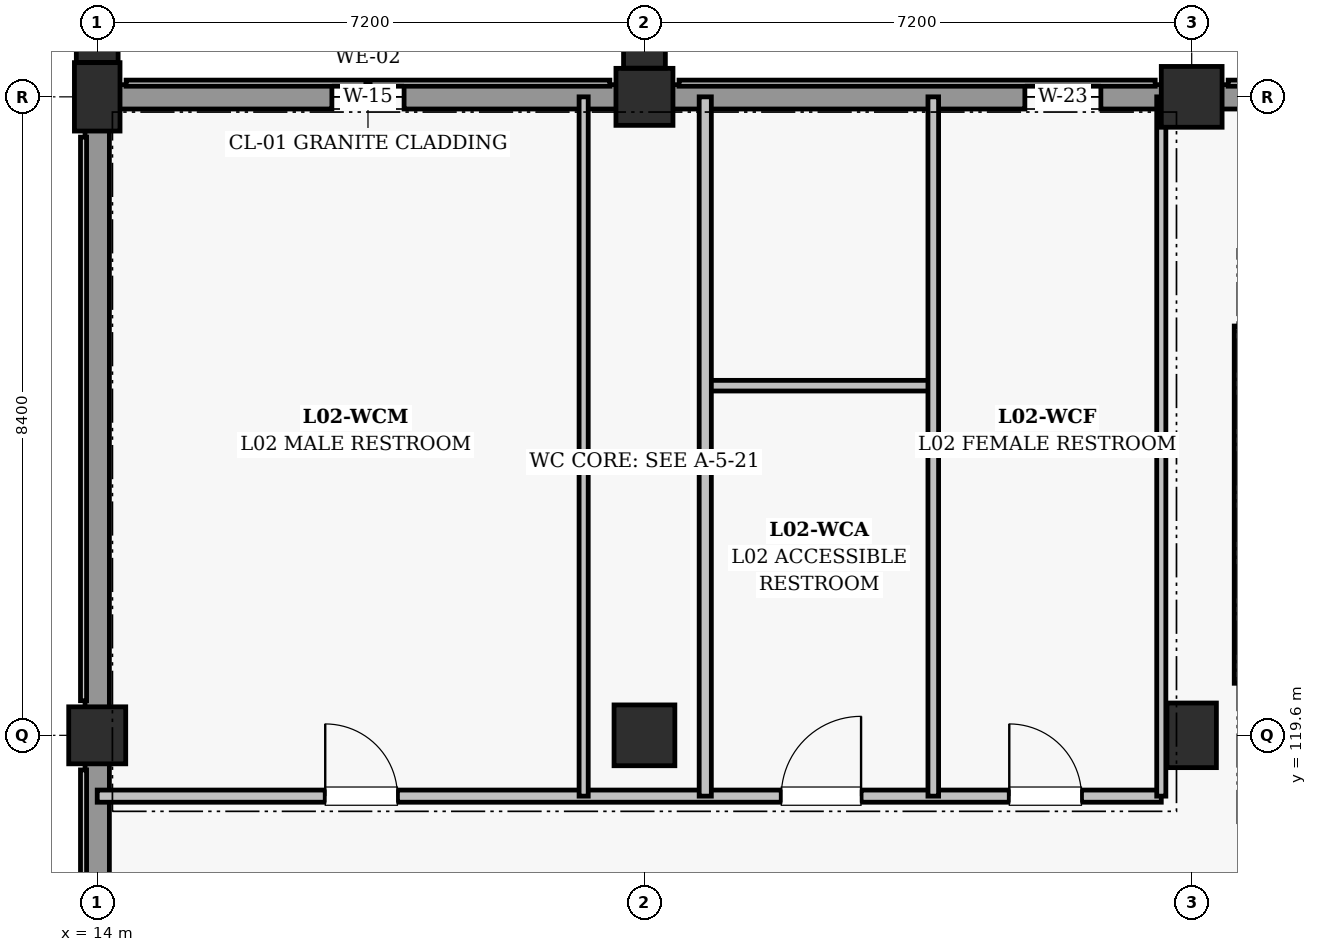
"""IFC4 building model, lengths in metres.
Left out: names, types, materials, properties, quantities, classifications, styles, units other than length and angle.
Written with IfcOpenShell. Run it as: python <this file> out.ifc"""

import sys

from ifc_helpers import new_model, si_unit, direction, frame, frame_2d, origin, origin_2d, place, context, subcontext, project, spatial, rectangle, extrude, element, fill, save


model = new_model("IFC4")
c1 = context("Model", 3, precision=1e-05, world=origin(), true_north=direction((0.0, 1.0)))
c2 = subcontext(c1, "Body", "Model", "MODEL_VIEW")
j1 = project(units=[si_unit("LENGTHUNIT", "METRE"), si_unit("PLANEANGLEUNIT", "RADIAN")], contexts=[c1])
p1 = place(None, origin())
s1 = spatial("IfcSite", under=j1, at=p1, CompositionType="ELEMENT")
p2 = place(p1, origin())
s2 = spatial("IfcBuilding", under=s1, at=p2, CompositionType="ELEMENT")
p3 = place(p2, frame((0.0, 0.0, 9.9)))
s3 = spatial("IfcBuildingStorey", under=s2, at=p3, CompositionType="ELEMENT", Elevation=9.9)
p4 = place(p3, frame((14.0, 119.6, 0.0), z_axis=(0.0, 0.0, 1.0), x_axis=(1.0, 0.0, 0.0)))
e1 = element("IfcColumn", 1, at=p4, inside=s3, PredefinedType="COLUMN", context=c2, shape_type="SweptSolid", body=[
    extrude(rectangle(XDim=0.75, YDim=0.75, at=origin_2d()), origin(), (0.0, 0.0, 1.0), 4.5),
])
p5 = place(p3, frame((14.0, 128.0, 0.0), z_axis=(0.0, 0.0, 1.0), x_axis=(1.0, 0.0, 0.0)))
e2 = element("IfcColumn", 2, at=p5, inside=s3, PredefinedType="COLUMN", context=c2, shape_type="SweptSolid", body=[
    extrude(rectangle(XDim=0.6, YDim=0.9, at=origin_2d()), origin(), (0.0, 0.0, 1.0), 4.5),
])
p6 = place(p3, frame((21.2, 119.6, 0.0), z_axis=(0.0, 0.0, 1.0), x_axis=(1.0, 0.0, 0.0)))
e3 = element("IfcColumn", 3, at=p6, inside=s3, PredefinedType="COLUMN", context=c2, shape_type="SweptSolid", body=[
    extrude(rectangle(XDim=0.8, YDim=0.8, at=origin_2d()), origin(), (0.0, 0.0, 1.0), 4.5),
])
p7 = place(p3, frame((21.2, 128.0, 0.0), z_axis=(0.0, 0.0, 1.0), x_axis=(1.0, 0.0, 0.0)))
e4 = element("IfcColumn", 4, at=p7, inside=s3, PredefinedType="COLUMN", context=c2, shape_type="SweptSolid", body=[
    extrude(rectangle(XDim=0.75, YDim=0.75, at=origin_2d()), origin(), (0.0, 0.0, 1.0), 4.5),
])
p8 = place(p3, frame((28.4, 119.6, 0.0), z_axis=(0.0, 0.0, 1.0), x_axis=(1.0, 0.0, 0.0)))
e5 = element("IfcColumn", 5, at=p8, inside=s3, PredefinedType="COLUMN", context=c2, shape_type="SweptSolid", body=[
    extrude(rectangle(XDim=0.65, YDim=0.85, at=origin_2d()), origin(), (0.0, 0.0, 1.0), 4.5),
])
p9 = place(p3, frame((28.4, 128.0, 0.0), z_axis=(0.0, 0.0, 1.0), x_axis=(1.0, 0.0, 0.0)))
e6 = element("IfcColumn", 6, at=p9, inside=s3, PredefinedType="COLUMN", context=c2, shape_type="SweptSolid", body=[
    extrude(rectangle(XDim=0.8, YDim=0.8, at=origin_2d()), origin(), (0.0, 0.0, 1.0), 4.5),
])
for number, where, z_axis, x_axis in (
    (7, (14.0, 128.853, 0.0), (0.0, 0.0, 1.0), (1.0, 0.0, 0.0)),
    (8, (21.2, 128.778, 0.0), (0.0, 0.0, 1.0), (1.0, 0.0, 0.0)),
):
    element("IfcColumn", number, at=place(p3, frame(where, z_axis=z_axis, x_axis=x_axis)), inside=s3, PredefinedType="PILASTER", context=c2, shape_type="SweptSolid", body=[
        extrude(rectangle(XDim=0.55, YDim=0.8, at=origin_2d()), origin(), (0.0, 0.0, 1.0), 4.5),
    ])
p10 = place(p3, frame((14.28, 128.0, 0.0), z_axis=(0.0, 0.0, 1.0), x_axis=(1.0, 0.0, 0.0)))
e9 = element("IfcWall", 9, at=p10, inside=s3, PredefinedType="SOLIDWALL", context=c2, shape_type="SweptSolid", body=[
    extrude(rectangle(XDim=6.565, YDim=0.32, at=frame_2d((3.282, 0.0))), origin(), (0.0, 0.0, 1.0), 3.305),
])
p11 = place(p10, frame((2.808, 0.0, 0.95)))
e10 = element("IfcOpeningElement", 10, at=p11, cuts=e9, PredefinedType="OPENING", context=c2, shape_type="SweptSolid", body=[
    extrude(rectangle(XDim=0.95, YDim=2.1, at=frame_2d((0.475, 1.05))), frame((0.0, 0.17, 0.0), z_axis=(0.0, -1.0, 0.0), x_axis=(1.0, 0.0, 0.0)), (0.0, 0.0, 1.0), 0.34),
])
p12 = place(p3, frame((21.555, 128.0, 0.0), z_axis=(0.0, 0.0, 1.0), x_axis=(1.0, 0.0, 0.0)))
e11 = element("IfcWall", 11, at=p12, inside=s3, PredefinedType="SOLIDWALL", context=c2, shape_type="SweptSolid", body=[
    extrude(rectangle(XDim=6.465, YDim=0.32, at=frame_2d((3.232, 0.0))), origin(), (0.0, 0.0, 1.0), 3.305),
])
p13 = place(p12, frame((4.65, 0.0, 1.85)))
e12 = element("IfcOpeningElement", 12, at=p13, cuts=e11, PredefinedType="OPENING", context=c2, shape_type="SweptSolid", body=[
    extrude(rectangle(XDim=1.0, YDim=0.95, at=frame_2d((0.5, 0.475))), frame((0.0, 0.17, 0.0), z_axis=(0.0, -1.0, 0.0), x_axis=(1.0, 0.0, 0.0)), (0.0, 0.0, 1.0), 0.34),
])
p14 = place(p3, frame((28.78, 128.0, 0.0), z_axis=(0.0, 0.0, 1.0), x_axis=(1.0, 0.0, 0.0)))
e13 = element("IfcWall", 13, at=p14, inside=s3, PredefinedType="SOLIDWALL", context=c2, shape_type="SweptSolid", body=[
    extrude(rectangle(XDim=6.515, YDim=0.32, at=frame_2d((3.257, 0.0))), origin(), (0.0, 0.0, 1.0), 3.355),
])
p15 = place(p3, frame((14.0, 111.555, 0.0), z_axis=(0.0, 0.0, 1.0), x_axis=(0.0, 1.0, 0.0)))
e14 = element("IfcWall", 14, at=p15, inside=s3, PredefinedType="SOLIDWALL", context=c2, shape_type="SweptSolid", body=[
    extrude(rectangle(XDim=7.69, YDim=0.32, at=frame_2d((3.845, 0.0))), origin(), (0.0, 0.0, 1.0), 3.405),
])
p16 = place(p3, frame((14.0, 119.955, 0.0), z_axis=(0.0, 0.0, 1.0), x_axis=(0.0, 1.0, 0.0)))
e15 = element("IfcWall", 15, at=p16, inside=s3, PredefinedType="SOLIDWALL", context=c2, shape_type="SweptSolid", body=[
    extrude(rectangle(XDim=7.615, YDim=0.32, at=frame_2d((3.808, 0.0))), origin(), (0.0, 0.0, 1.0), 3.405),
])
p17 = place(p3, frame((29.085, 124.985, 0.0), z_axis=(0.0, 0.0, 1.0), x_axis=(0.0, -1.0, 0.0)))
e16 = element("IfcWall", 16, at=p17, inside=s3, PredefinedType="SHEAR", context=c2, shape_type="SweptSolid", body=[
    extrude(rectangle(XDim=4.7, YDim=0.25, at=frame_2d((2.35, 0.0))), origin(), (0.0, 0.0, 1.0), 4.175),
])
p18 = place(p3, frame((14.0, 118.8, 0.0), z_axis=(0.0, 0.0, 1.0), x_axis=(1.0, 0.0, 0.0)))
e17 = element("IfcWall", 17, at=p18, inside=s3, PredefinedType="PARTITIONING", context=c2, shape_type="SweptSolid", body=[
    extrude(rectangle(XDim=14.0, YDim=0.16, at=frame_2d((7.0, 0.0))), origin(), (0.0, 0.0, 1.0), 3.36),
])
p19 = place(p18, frame((3.0, 0.0, 0.0)))
e18 = element("IfcOpeningElement", 18, at=p19, cuts=e17, PredefinedType="OPENING", context=c2, shape_type="SweptSolid", body=[
    extrude(rectangle(XDim=0.95, YDim=2.15, at=frame_2d((0.475, 1.075))), frame((0.0, 0.09, 0.0), z_axis=(0.0, -1.0, 0.0), x_axis=(1.0, 0.0, 0.0)), (0.0, 0.0, 1.0), 0.18),
])
p20 = place(p18, frame((9.0, 0.0, 0.0)))
e19 = element("IfcOpeningElement", 19, at=p20, cuts=e17, PredefinedType="OPENING", context=c2, shape_type="SweptSolid", body=[
    extrude(rectangle(XDim=1.05, YDim=2.15, at=frame_2d((0.525, 1.075))), frame((0.0, 0.09, 0.0), z_axis=(0.0, -1.0, 0.0), x_axis=(1.0, 0.0, 0.0)), (0.0, 0.0, 1.0), 0.18),
])
p21 = place(p18, frame((12.0, 0.0, 0.0)))
e20 = element("IfcOpeningElement", 20, at=p21, cuts=e17, PredefinedType="OPENING", context=c2, shape_type="SweptSolid", body=[
    extrude(rectangle(XDim=0.95, YDim=2.15, at=frame_2d((0.475, 1.075))), frame((0.0, 0.09, 0.0), z_axis=(0.0, -1.0, 0.0), x_axis=(1.0, 0.0, 0.0)), (0.0, 0.0, 1.0), 0.18),
])
p22 = place(p3, frame((22.0, 124.2, 0.0), z_axis=(0.0, 0.0, 1.0), x_axis=(1.0, 0.0, 0.0)))
e21 = element("IfcWall", 21, at=p22, inside=s3, PredefinedType="PARTITIONING", context=c2, shape_type="SweptSolid", body=[
    extrude(rectangle(XDim=3.0, YDim=0.14, at=frame_2d((1.5, 0.0))), origin(), (0.0, 0.0, 1.0), 3.56),
])
p23 = place(p3, frame((20.4, 118.8, 0.0), z_axis=(0.0, 0.0, 1.0), x_axis=(0.0, 1.0, 0.0)))
e22 = element("IfcWall", 22, at=p23, inside=s3, PredefinedType="PARTITIONING", context=c2, shape_type="SweptSolid", body=[
    extrude(rectangle(XDim=9.2, YDim=0.12, at=frame_2d((4.6, 0.0))), origin(), (0.0, 0.0, 1.0), 3.41),
])
p24 = place(p3, frame((22.0, 118.8, 0.0), z_axis=(0.0, 0.0, 1.0), x_axis=(0.0, 1.0, 0.0)))
e23 = element("IfcWall", 23, at=p24, inside=s3, PredefinedType="PARTITIONING", context=c2, shape_type="SweptSolid", body=[
    extrude(rectangle(XDim=9.2, YDim=0.16, at=frame_2d((4.6, 0.0))), origin(), (0.0, 0.0, 1.0), 3.36),
])
p25 = place(p3, frame((25.0, 118.8, 0.0), z_axis=(0.0, 0.0, 1.0), x_axis=(0.0, 1.0, 0.0)))
e24 = element("IfcWall", 24, at=p25, inside=s3, PredefinedType="PARTITIONING", context=c2, shape_type="SweptSolid", body=[
    extrude(rectangle(XDim=9.2, YDim=0.14, at=frame_2d((4.6, 0.0))), origin(), (0.0, 0.0, 1.0), 3.36),
])
p26 = place(p3, frame((28.0, 118.8, 0.0), z_axis=(0.0, 0.0, 1.0), x_axis=(0.0, 1.0, 0.0)))
e25 = element("IfcWall", 25, at=p26, inside=s3, PredefinedType="PARTITIONING", context=c2, shape_type="SweptSolid", body=[
    extrude(rectangle(XDim=9.2, YDim=0.12, at=frame_2d((4.6, 0.0))), origin(), (0.0, 0.0, 1.0), 3.36),
])
p27 = place(p11, origin())
e26 = element("IfcWindow", 26, at=p27, inside=s3, PartitioningType="SINGLE_PANEL", PredefinedType="WINDOW", context=c2, shape_type="SweptSolid", body=[
    extrude(rectangle(XDim=0.95, YDim=2.1, at=frame_2d((0.475, 1.05))), frame((0.0, 0.03, 0.0), z_axis=(0.0, -1.0, 0.0), x_axis=(1.0, 0.0, 0.0)), (0.0, 0.0, 1.0), 0.06),
])
fill(e10, e26)
p28 = place(p13, origin())
e27 = element("IfcWindow", 27, at=p28, inside=s3, PartitioningType="SINGLE_PANEL", PredefinedType="WINDOW", context=c2, shape_type="SweptSolid", body=[
    extrude(rectangle(XDim=1.0, YDim=0.95, at=frame_2d((0.5, 0.475))), frame((0.0, 0.03, 0.0), z_axis=(0.0, -1.0, 0.0), x_axis=(1.0, 0.0, 0.0)), (0.0, 0.0, 1.0), 0.06),
])
fill(e12, e27)
p29 = place(p19, origin())
e28 = element("IfcDoor", 28, at=p29, inside=s3, OperationType="SINGLE_SWING_LEFT", PredefinedType="DOOR", context=c2, shape_type="SweptSolid", body=[
    extrude(rectangle(XDim=0.95, YDim=2.15, at=frame_2d((0.475, 1.075))), frame((0.0, 0.025, 0.0), z_axis=(0.0, -1.0, 0.0), x_axis=(1.0, 0.0, 0.0)), (0.0, 0.0, 1.0), 0.05),
])
fill(e18, e28)
p30 = place(p20, origin())
e29 = element("IfcDoor", 29, at=p30, inside=s3, OperationType="SINGLE_SWING_RIGHT", PredefinedType="DOOR", context=c2, shape_type="SweptSolid", body=[
    extrude(rectangle(XDim=1.05, YDim=2.15, at=frame_2d((0.525, 1.075))), frame((0.0, 0.025, 0.0), z_axis=(0.0, -1.0, 0.0), x_axis=(1.0, 0.0, 0.0)), (0.0, 0.0, 1.0), 0.05),
])
fill(e19, e29)
p31 = place(p21, origin())
e30 = element("IfcDoor", 30, at=p31, inside=s3, OperationType="SINGLE_SWING_LEFT", PredefinedType="DOOR", context=c2, shape_type="SweptSolid", body=[
    extrude(rectangle(XDim=0.95, YDim=2.15, at=frame_2d((0.475, 1.075))), frame((0.0, 0.025, 0.0), z_axis=(0.0, -1.0, 0.0), x_axis=(1.0, 0.0, 0.0)), (0.0, 0.0, 1.0), 0.05),
])
fill(e20, e30)
save(model, sys.argv[1])
